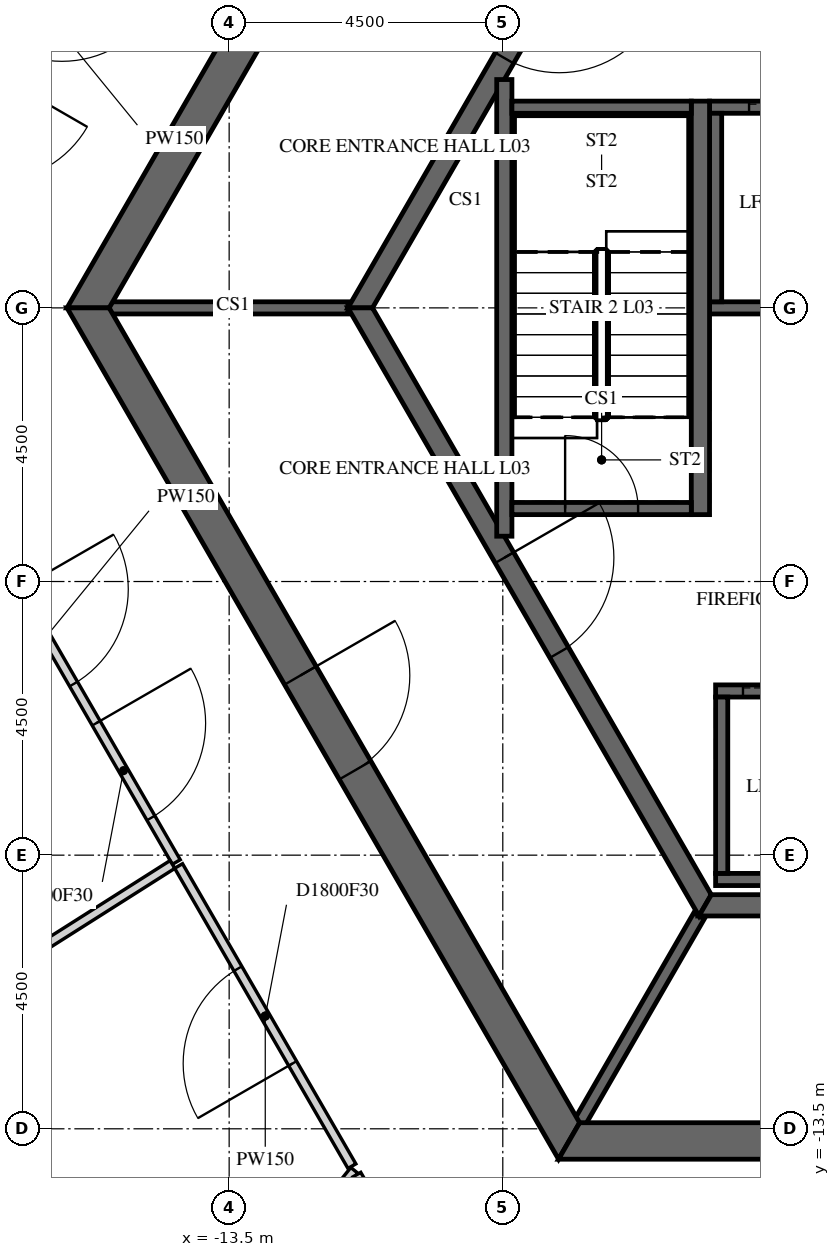
"""IFC4 building model, lengths in metres.
Left out: names, types, materials, properties, quantities, classifications, styles, units other than length and angle.
Written with IfcOpenShell. Run it as: python <this file> out.ifc"""

import sys

from ifc_helpers import new_model, si_unit, direction, frame, frame_2d, origin, place, context, subcontext, project, spatial, polyline, rectangle, outline, extrude, element, fill, save


model = new_model("IFC4")
c1 = context("Model", 3, precision=1e-05, world=origin(), true_north=direction((0.0, 1.0)))
c2 = subcontext(c1, "Body", "Model", "MODEL_VIEW")
j1 = project(units=[si_unit("LENGTHUNIT", "METRE"), si_unit("PLANEANGLEUNIT", "RADIAN")], contexts=[c1])
p1 = place(None, origin())
s1 = spatial("IfcSite", under=j1, at=p1, CompositionType="ELEMENT")
p2 = place(p1, origin())
s2 = spatial("IfcBuilding", under=s1, at=p2, CompositionType="ELEMENT")
p3 = place(p2, frame((0.0, 0.0, 20.5)))
s3 = spatial("IfcBuildingStorey", under=s2, at=p3, CompositionType="ELEMENT", Elevation=20.5)
p4 = place(p3, frame((-7.91, 13.7, -0.25), z_axis=(0.0, 0.0, 1.0), x_axis=(-0.499999880136, -0.866025472988, 0.0)))
e1 = element("IfcWall", 1, at=p4, inside=s3, PredefinedType="SHEAR", context=c2, shape_type="SweptSolid", body=[
    extrude(outline(polyline([(-0.173, -0.3), (15.993, -0.3), (15.646, 0.3), (0.173, 0.3), (-0.173, -0.3)])), origin(), (0.0, 0.0, 1.0), 5.5),
])
p5 = place(p4, frame((7.039, 0.0, 0.25)))
e2 = element("IfcOpeningElement", 2, at=p5, cuts=e1, PredefinedType="OPENING", context=c2, shape_type="SweptSolid", body=[
    extrude(rectangle(XDim=1.8, YDim=2.4, at=frame_2d((0.9, 1.2))), frame((0.0, 0.31, 0.0), z_axis=(0.0, -1.0, 0.0), x_axis=(1.0, 0.0, 0.0)), (0.0, 0.0, 1.0), 0.62),
])
p6 = place(p3, frame((-15.819, 0.0, -0.25), z_axis=(0.0, 0.0, 1.0), x_axis=(0.499999880136, -0.866025472988, 0.0)))
e3 = element("IfcWall", 3, at=p6, inside=s3, PredefinedType="SHEAR", context=c2, shape_type="SweptSolid", body=[
    extrude(outline(polyline([(-0.173, -0.3), (15.993, -0.3), (15.646, 0.3), (0.173, 0.3), (-0.173, -0.3)])), origin(), (0.0, 0.0, 1.0), 5.5),
])
p7 = place(p6, frame((6.981, 0.0, 0.25)))
e4 = element("IfcOpeningElement", 4, at=p7, cuts=e3, PredefinedType="OPENING", context=c2, shape_type="SweptSolid", body=[
    extrude(rectangle(XDim=1.8, YDim=2.4, at=frame_2d((0.9, 1.2))), frame((0.0, 0.31, 0.0), z_axis=(0.0, -1.0, 0.0), x_axis=(1.0, 0.0, 0.0)), (0.0, 0.0, 1.0), 0.62),
])
p8 = place(p3, frame((-7.91, -13.7, -0.25), z_axis=(0.0, 0.0, 1.0), x_axis=(1.0, 0.0, 0.0)))
e5 = element("IfcWall", 5, at=p8, inside=s3, PredefinedType="SHEAR", context=c2, shape_type="SweptSolid", body=[
    extrude(outline(polyline([(-0.173, -0.3), (15.993, -0.3), (15.646, 0.3), (0.173, 0.3), (-0.173, -0.3)])), origin(), (0.0, 0.0, 1.0), 5.5),
])
p9 = place(p8, frame((7.31, 0.0, 0.25)))
e6 = element("IfcOpeningElement", 6, at=p9, cuts=e5, PredefinedType="OPENING", context=c2, shape_type="SweptSolid", body=[
    extrude(rectangle(XDim=1.2, YDim=2.4, at=frame_2d((0.6, 1.2))), frame((0.0, 0.31, 0.0), z_axis=(0.0, -1.0, 0.0), x_axis=(1.0, 0.0, 0.0)), (0.0, 0.0, 1.0), 0.62),
])
p10 = place(p3, frame((-5.673, 9.825, -0.25), z_axis=(0.0, 0.0, 1.0), x_axis=(-0.499995046907, -0.866028263435, 0.0)))
e7 = element("IfcWall", 7, at=p10, inside=s3, PredefinedType="SHEAR", context=c2, shape_type="SweptSolid", body=[
    extrude(outline(polyline([(-0.101, -0.175), (11.446, -0.175), (11.244, 0.175), (0.101, 0.175), (-0.101, -0.175)])), origin(), (0.0, 0.0, 1.0), 5.5),
])
p11 = place(p10, frame((4.801, 0.0, 0.25)))
e8 = element("IfcOpeningElement", 8, at=p11, cuts=e7, PredefinedType="OPENING", context=c2, shape_type="SweptSolid", body=[
    extrude(rectangle(XDim=1.8, YDim=2.4, at=frame_2d((0.9, 1.2))), frame((0.0, 0.185, 0.0), z_axis=(0.0, -1.0, 0.0), x_axis=(1.0, 0.0, 0.0)), (0.0, 0.0, 1.0), 0.37),
])
p12 = place(p3, frame((-11.345, 0.0, -0.25), z_axis=(0.0, 0.0, 1.0), x_axis=(0.499995046907, -0.866028263435, 0.0)))
e9 = element("IfcWall", 9, at=p12, inside=s3, PredefinedType="SHEAR", context=c2, shape_type="SweptSolid", body=[
    extrude(outline(polyline([(-0.101, -0.175), (11.446, -0.175), (11.244, 0.175), (0.101, 0.175), (-0.101, -0.175)])), origin(), (0.0, 0.0, 1.0), 5.5),
])
p13 = place(p12, frame((4.744, 0.0, 0.25)))
e10 = element("IfcOpeningElement", 10, at=p13, cuts=e9, PredefinedType="OPENING", context=c2, shape_type="SweptSolid", body=[
    extrude(rectangle(XDim=1.8, YDim=2.4, at=frame_2d((0.9, 1.2))), frame((0.0, 0.185, 0.0), z_axis=(0.0, -1.0, 0.0), x_axis=(1.0, 0.0, 0.0)), (0.0, 0.0, 1.0), 0.37),
])
p14 = place(p3, frame((-5.673, -9.825, -0.25), z_axis=(0.0, 0.0, 1.0), x_axis=(1.0, 0.0, 0.0)))
e11 = element("IfcWall", 11, at=p14, inside=s3, PredefinedType="SHEAR", context=c2, shape_type="SweptSolid", body=[
    extrude(outline(polyline([(-0.101, -0.175), (11.446, -0.175), (11.244, 0.175), (0.101, 0.175), (-0.101, -0.175)])), origin(), (0.0, 0.0, 1.0), 5.5),
])
p15 = place(p3, frame((-5.6, 3.3, -0.25), z_axis=(0.0, 0.0, 1.0), x_axis=(1.0, 0.0, 0.0)))
e12 = element("IfcWall", 12, at=p15, inside=s3, PredefinedType="SHEAR", context=c2, shape_type="SweptSolid", body=[
    extrude(rectangle(XDim=11.2, YDim=0.2, at=frame_2d((5.6, 0.0))), origin(), (0.0, 0.0, 1.0), 5.5),
])
p16 = place(p15, frame((0.65, 0.0, 0.25)))
e13 = element("IfcOpeningElement", 13, at=p16, cuts=e12, PredefinedType="OPENING", context=c2, shape_type="SweptSolid", body=[
    extrude(rectangle(XDim=1.1, YDim=2.1, at=frame_2d((0.55, 1.05))), frame((0.0, 0.11, 0.0), z_axis=(0.0, -1.0, 0.0), x_axis=(1.0, 0.0, 0.0)), (0.0, 0.0, 1.0), 0.22),
])
p17 = place(p15, frame((2.85, 0.0, 0.25)))
e14 = element("IfcOpeningElement", 14, at=p17, cuts=e12, PredefinedType="OPENING", context=c2, shape_type="SweptSolid", body=[
    extrude(rectangle(XDim=1.1, YDim=2.1, at=frame_2d((0.55, 1.05))), frame((0.0, 0.11, 0.0), z_axis=(0.0, -1.0, 0.0), x_axis=(1.0, 0.0, 0.0)), (0.0, 0.0, 1.0), 0.22),
])
p18 = place(p15, frame((5.05, 0.0, 0.25)))
e15 = element("IfcOpeningElement", 15, at=p18, cuts=e12, PredefinedType="OPENING", context=c2, shape_type="SweptSolid", body=[
    extrude(rectangle(XDim=1.1, YDim=2.1, at=frame_2d((0.55, 1.05))), frame((0.0, 0.11, 0.0), z_axis=(0.0, -1.0, 0.0), x_axis=(1.0, 0.0, 0.0)), (0.0, 0.0, 1.0), 0.22),
])
p19 = place(p15, frame((7.25, 0.0, 0.25)))
e16 = element("IfcOpeningElement", 16, at=p19, cuts=e12, PredefinedType="OPENING", context=c2, shape_type="SweptSolid", body=[
    extrude(rectangle(XDim=1.1, YDim=2.1, at=frame_2d((0.55, 1.05))), frame((0.0, 0.11, 0.0), z_axis=(0.0, -1.0, 0.0), x_axis=(1.0, 0.0, 0.0)), (0.0, 0.0, 1.0), 0.22),
])
p20 = place(p15, frame((9.45, 0.0, 0.25)))
e17 = element("IfcOpeningElement", 17, at=p20, cuts=e12, PredefinedType="OPENING", context=c2, shape_type="SweptSolid", body=[
    extrude(rectangle(XDim=1.1, YDim=2.1, at=frame_2d((0.55, 1.05))), frame((0.0, 0.11, 0.0), z_axis=(0.0, -1.0, 0.0), x_axis=(1.0, 0.0, 0.0)), (0.0, 0.0, 1.0), 0.22),
])
p21 = place(p3, frame((-5.6, 0.0, -0.25), z_axis=(0.0, 0.0, 1.0), x_axis=(1.0, 0.0, 0.0)))
e18 = element("IfcWall", 18, at=p21, inside=s3, PredefinedType="SHEAR", context=c2, shape_type="SweptSolid", body=[
    extrude(rectangle(XDim=11.2, YDim=0.2, at=frame_2d((5.6, 0.0))), origin(), (0.0, 0.0, 1.0), 5.5),
])
p22 = place(p3, frame((-5.5, 0.1, -0.25), z_axis=(0.0, 0.0, 1.0), x_axis=(0.0, 1.0, 0.0)))
e19 = element("IfcWall", 19, at=p22, inside=s3, PredefinedType="SHEAR", context=c2, shape_type="SweptSolid", body=[
    extrude(rectangle(XDim=3.1, YDim=0.2, at=frame_2d((1.55, 0.0))), origin(), (0.0, 0.0, 1.0), 5.5),
])
p23 = place(p3, frame((-5.5, -6.3, -0.25), z_axis=(0.0, 0.0, 1.0), x_axis=(1.0, 0.0, 0.0)))
e20 = element("IfcWall", 20, at=p23, inside=s3, PredefinedType="SHEAR", context=c2, shape_type="SweptSolid", body=[
    extrude(rectangle(XDim=9.2, YDim=0.2, at=frame_2d((4.6, 0.0))), origin(), (0.0, 0.0, 1.0), 5.5),
])
p24 = place(p23, frame((0.45, 0.0, 0.25)))
e21 = element("IfcOpeningElement", 21, at=p24, cuts=e20, PredefinedType="OPENING", context=c2, shape_type="SweptSolid", body=[
    extrude(rectangle(XDim=1.1, YDim=2.1, at=frame_2d((0.55, 1.05))), frame((0.0, 0.11, 0.0), z_axis=(0.0, -1.0, 0.0), x_axis=(1.0, 0.0, 0.0)), (0.0, 0.0, 1.0), 0.22),
])
p25 = place(p23, frame((2.25, 0.0, 0.25)))
e22 = element("IfcOpeningElement", 22, at=p25, cuts=e20, PredefinedType="OPENING", context=c2, shape_type="SweptSolid", body=[
    extrude(rectangle(XDim=1.1, YDim=2.1, at=frame_2d((0.55, 1.05))), frame((0.0, 0.11, 0.0), z_axis=(0.0, -1.0, 0.0), x_axis=(1.0, 0.0, 0.0)), (0.0, 0.0, 1.0), 0.22),
])
p26 = place(p23, frame((4.05, 0.0, 0.25)))
e23 = element("IfcOpeningElement", 23, at=p26, cuts=e20, PredefinedType="OPENING", context=c2, shape_type="SweptSolid", body=[
    extrude(rectangle(XDim=1.1, YDim=2.1, at=frame_2d((0.55, 1.05))), frame((0.0, 0.11, 0.0), z_axis=(0.0, -1.0, 0.0), x_axis=(1.0, 0.0, 0.0)), (0.0, 0.0, 1.0), 0.22),
])
p27 = place(p23, frame((5.85, 0.0, 0.25)))
e24 = element("IfcOpeningElement", 24, at=p27, cuts=e20, PredefinedType="OPENING", context=c2, shape_type="SweptSolid", body=[
    extrude(rectangle(XDim=1.1, YDim=2.1, at=frame_2d((0.55, 1.05))), frame((0.0, 0.11, 0.0), z_axis=(0.0, -1.0, 0.0), x_axis=(1.0, 0.0, 0.0)), (0.0, 0.0, 1.0), 0.22),
])
p28 = place(p23, frame((7.65, 0.0, 0.25)))
e25 = element("IfcOpeningElement", 25, at=p28, cuts=e20, PredefinedType="OPENING", context=c2, shape_type="SweptSolid", body=[
    extrude(rectangle(XDim=1.1, YDim=2.1, at=frame_2d((0.55, 1.05))), frame((0.0, 0.11, 0.0), z_axis=(0.0, -1.0, 0.0), x_axis=(1.0, 0.0, 0.0)), (0.0, 0.0, 1.0), 0.22),
])
p29 = place(p3, frame((-5.5, -9.4, -0.25), z_axis=(0.0, 0.0, 1.0), x_axis=(1.0, 0.0, 0.0)))
e26 = element("IfcWall", 26, at=p29, inside=s3, PredefinedType="SHEAR", context=c2, shape_type="SweptSolid", body=[
    extrude(rectangle(XDim=9.2, YDim=0.2, at=frame_2d((4.6, 0.0))), origin(), (0.0, 0.0, 1.0), 5.5),
])
p30 = place(p3, frame((-5.4, -9.3, -0.25), z_axis=(0.0, 0.0, 1.0), x_axis=(0.0, 1.0, 0.0)))
e27 = element("IfcWall", 27, at=p30, inside=s3, PredefinedType="SHEAR", context=c2, shape_type="SweptSolid", body=[
    extrude(rectangle(XDim=2.9, YDim=0.2, at=frame_2d((1.45, 0.0))), origin(), (0.0, 0.0, 1.0), 5.5),
])
p31 = place(p3, frame((-11.547, 0.0, -0.25), z_axis=(0.0, 0.0, 1.0), x_axis=(-1.0, 0.0, 0.0)))
e28 = element("IfcWall", 28, at=p31, inside=s3, PredefinedType="SHEAR", context=c2, shape_type="SweptSolid", body=[
    extrude(rectangle(XDim=3.926, YDim=0.2, at=frame_2d((1.963, 0.0))), origin(), (0.0, 0.0, 1.0), 5.5),
])
p32 = place(p3, frame((-5.773, -10.0, -0.25), z_axis=(0.0, 0.0, 1.0), x_axis=(-0.500038251005, -0.86600331843, 0.0)))
e29 = element("IfcWall", 29, at=p32, inside=s3, PredefinedType="SHEAR", context=c2, shape_type="SweptSolid", body=[
    extrude(rectangle(XDim=3.926, YDim=0.2, at=frame_2d((1.963, 0.0))), origin(), (0.0, 0.0, 1.0), 5.5),
])
p33 = place(p3, frame((-5.75, -3.4, -0.25), z_axis=(0.0, 0.0, 1.0), x_axis=(0.0, 1.0, 0.0)))
e30 = element("IfcWall", 30, at=p33, inside=s3, PredefinedType="SHEAR", context=c2, shape_type="SweptSolid", body=[
    extrude(rectangle(XDim=6.8, YDim=0.3, at=frame_2d((3.4, 0.0))), origin(), (0.0, 0.0, 1.0), 5.5),
])
p34 = place(p3, frame((-8.975, -3.755, -0.25), z_axis=(0.0, 0.0, 1.0), x_axis=(0.0, 1.0, 0.0)))
e31 = element("IfcWall", 31, at=p34, inside=s3, PredefinedType="SHEAR", context=c2, shape_type="SweptSolid", body=[
    extrude(rectangle(XDim=7.51, YDim=0.25, at=frame_2d((3.755, 0.0))), origin(), (0.0, 0.0, 1.0), 5.5),
])
p35 = place(p3, frame((-8.85, 3.3, -0.25), z_axis=(0.0, 0.0, 1.0), x_axis=(1.0, 0.0, 0.0)))
e32 = element("IfcWall", 32, at=p35, inside=s3, PredefinedType="SHEAR", context=c2, shape_type="SweptSolid", body=[
    extrude(rectangle(XDim=2.95, YDim=0.2, at=frame_2d((1.475, 0.0))), origin(), (0.0, 0.0, 1.0), 5.5),
])
p36 = place(p3, frame((-8.85, -3.3, -0.25), z_axis=(0.0, 0.0, 1.0), x_axis=(1.0, 0.0, 0.0)))
e33 = element("IfcWall", 33, at=p36, inside=s3, PredefinedType="SHEAR", context=c2, shape_type="SweptSolid", body=[
    extrude(rectangle(XDim=2.95, YDim=0.2, at=frame_2d((1.475, 0.0))), origin(), (0.0, 0.0, 1.0), 5.5),
])
p37 = place(p36, frame((0.875, 0.0, 0.25)))
e34 = element("IfcOpeningElement", 34, at=p37, cuts=e33, PredefinedType="OPENING", context=c2, shape_type="SweptSolid", body=[
    extrude(rectangle(XDim=1.2, YDim=2.4, at=frame_2d((0.6, 1.2))), frame((0.0, 0.11, 0.0), z_axis=(0.0, -1.0, 0.0), x_axis=(1.0, 0.0, 0.0)), (0.0, 0.0, 1.0), 0.22),
])
p38 = place(p3, frame((-19.584, -24.28, 0.0), z_axis=(0.0, 0.0, 1.0), x_axis=(0.627807267634, 0.77836882948, 0.0)))
e35 = element("IfcWall", 35, at=p38, inside=s3, PredefinedType="PARTITIONING", context=c2, shape_type="SweptSolid", body=[
    extrude(rectangle(XDim=12.971, YDim=0.15, at=frame_2d((6.485, 0.0))), origin(), (0.0, 0.0, 1.0), 5.25),
])
p39 = place(p3, frame((-18.649, -1.7, 0.0), z_axis=(0.0, 0.0, 1.0), x_axis=(0.499985805234, -0.866033598981, 0.0)))
e36 = element("IfcWall", 36, at=p39, inside=s3, PredefinedType="PARTITIONING", context=c2, shape_type="SweptSolid", body=[
    extrude(rectangle(XDim=8.56, YDim=0.15, at=frame_2d((4.28, 0.0))), origin(), (0.0, 0.0, 1.0), 5.25),
])
p40 = place(p39, frame((0.836, 0.0, 0.0)))
e37 = element("IfcOpeningElement", 37, at=p40, cuts=e36, PredefinedType="OPENING", context=c2, shape_type="SweptSolid", body=[
    extrude(rectangle(XDim=1.8, YDim=2.1, at=frame_2d((0.9, 1.05))), frame((0.0, 0.085, 0.0), z_axis=(0.0, -1.0, 0.0), x_axis=(1.0, 0.0, 0.0)), (0.0, 0.0, 1.0), 0.17),
])
p41 = place(p39, frame((3.38, 0.0, 0.0)))
e38 = element("IfcOpeningElement", 38, at=p41, cuts=e36, PredefinedType="OPENING", context=c2, shape_type="SweptSolid", body=[
    extrude(rectangle(XDim=1.8, YDim=2.1, at=frame_2d((0.9, 1.05))), frame((0.0, 0.085, 0.0), z_axis=(0.0, -1.0, 0.0), x_axis=(1.0, 0.0, 0.0)), (0.0, 0.0, 1.0), 0.17),
])
p42 = place(p39, frame((5.924, 0.0, 0.0)))
e39 = element("IfcOpeningElement", 39, at=p42, cuts=e36, PredefinedType="OPENING", context=c2, shape_type="SweptSolid", body=[
    extrude(rectangle(XDim=1.8, YDim=2.1, at=frame_2d((0.9, 1.05))), frame((0.0, 0.085, 0.0), z_axis=(0.0, -1.0, 0.0), x_axis=(1.0, 0.0, 0.0)), (0.0, 0.0, 1.0), 0.17),
])
p43 = place(p3, frame((-18.603, -11.798, 0.0), z_axis=(0.0, 0.0, 1.0), x_axis=(0.844511305062, 0.535537725677, 0.0)))
e40 = element("IfcWall", 40, at=p43, inside=s3, PredefinedType="PARTITIONING", context=c2, shape_type="SweptSolid", body=[
    extrude(rectangle(XDim=4.938, YDim=0.15, at=frame_2d((2.469, 0.0))), origin(), (0.0, 0.0, 1.0), 4.496),
])
p44 = place(p3, frame((-14.722, 8.5, 0.0), z_axis=(0.0, 0.0, 1.0), x_axis=(-0.500085786821, -0.865975869075, 0.0)))
e41 = element("IfcWall", 41, at=p44, inside=s3, PredefinedType="PARTITIONING", context=c2, shape_type="SweptSolid", body=[
    extrude(rectangle(XDim=7.91, YDim=0.15, at=frame_2d((3.955, 0.0))), origin(), (0.0, 0.0, 1.0), 5.25),
])
p45 = place(p44, frame((0.771, 0.0, 0.0)))
e42 = element("IfcOpeningElement", 42, at=p45, cuts=e41, PredefinedType="OPENING", context=c2, shape_type="SweptSolid", body=[
    extrude(rectangle(XDim=1.8, YDim=2.1, at=frame_2d((0.9, 1.05))), frame((0.0, 0.085, 0.0), z_axis=(0.0, -1.0, 0.0), x_axis=(1.0, 0.0, 0.0)), (0.0, 0.0, 1.0), 0.17),
])
p46 = place(p44, frame((3.055, 0.0, 0.0)))
e43 = element("IfcOpeningElement", 43, at=p46, cuts=e41, PredefinedType="OPENING", context=c2, shape_type="SweptSolid", body=[
    extrude(rectangle(XDim=1.8, YDim=2.1, at=frame_2d((0.9, 1.05))), frame((0.0, 0.085, 0.0), z_axis=(0.0, -1.0, 0.0), x_axis=(1.0, 0.0, 0.0)), (0.0, 0.0, 1.0), 0.17),
])
p47 = place(p44, frame((5.339, 0.0, 0.0)))
e44 = element("IfcOpeningElement", 44, at=p47, cuts=e41, PredefinedType="OPENING", context=c2, shape_type="SweptSolid", body=[
    extrude(rectangle(XDim=1.8, YDim=2.1, at=frame_2d((0.9, 1.05))), frame((0.0, 0.085, 0.0), z_axis=(0.0, -1.0, 0.0), x_axis=(1.0, 0.0, 0.0)), (0.0, 0.0, 1.0), 0.17),
])
p48 = place(p3, frame((-11.481, -14.114, 0.0), z_axis=(0.0, 0.0, 1.0), x_axis=(-0.500049947645, 0.865996564577, 0.0)))
e45 = element("IfcWall", 45, at=p48, inside=s3, PredefinedType="PARTITIONING", context=c2, shape_type="SweptSolid", body=[
    extrude(rectangle(XDim=5.7, YDim=0.15, at=frame_2d((2.85, 0.0))), origin(), (0.0, 0.0, 1.0), 5.25),
])
p49 = place(p48, frame((1.95, 0.0, 0.0)))
e46 = element("IfcOpeningElement", 46, at=p49, cuts=e45, PredefinedType="OPENING", context=c2, shape_type="SweptSolid", body=[
    extrude(rectangle(XDim=1.8, YDim=2.1, at=frame_2d((0.9, 1.05))), frame((0.0, 0.085, 0.0), z_axis=(0.0, -1.0, 0.0), x_axis=(1.0, 0.0, 0.0)), (0.0, 0.0, 1.0), 0.17),
])
p50 = place(p3, frame((-9.815, -17.0, 0.0), z_axis=(0.0, 0.0, 1.0), x_axis=(-0.500080068905, 0.865979171045, 0.0)))
e47 = element("IfcWall", 47, at=p50, inside=s3, PredefinedType="PARTITIONING", context=c2, shape_type="SweptSolid", body=[
    extrude(rectangle(XDim=3.171, YDim=0.15, at=frame_2d((1.586, 0.0))), origin(), (0.0, 0.0, 1.0), 5.25),
])
p51 = place(p50, frame((1.086, 0.0, 0.0)))
e48 = element("IfcOpeningElement", 48, at=p51, cuts=e47, PredefinedType="OPENING", context=c2, shape_type="SweptSolid", body=[
    extrude(rectangle(XDim=1.0, YDim=2.1, at=frame_2d((0.5, 1.05))), frame((0.0, 0.085, 0.0), z_axis=(0.0, -1.0, 0.0), x_axis=(1.0, 0.0, 0.0)), (0.0, 0.0, 1.0), 0.17),
])
p52 = place(p7, origin())
e49 = element("IfcDoor", 49, at=p52, inside=s3, OperationType="DOUBLE_DOOR_SINGLE_SWING", PredefinedType="DOOR", context=c2, shape_type="SweptSolid", body=[
    extrude(rectangle(XDim=1.8, YDim=2.4, at=frame_2d((0.9, 1.2))), frame((0.0, 0.025, 0.0), z_axis=(0.0, -1.0, 0.0), x_axis=(1.0, 0.0, 0.0)), (0.0, 0.0, 1.0), 0.05),
])
fill(e4, e49)
p53 = place(p11, origin())
e50 = element("IfcDoor", 50, at=p53, inside=s3, OperationType="DOUBLE_DOOR_SINGLE_SWING", PredefinedType="DOOR", context=c2, shape_type="SweptSolid", body=[
    extrude(rectangle(XDim=1.8, YDim=2.4, at=frame_2d((0.9, 1.2))), frame((0.0, 0.025, 0.0), z_axis=(0.0, -1.0, 0.0), x_axis=(1.0, 0.0, 0.0)), (0.0, 0.0, 1.0), 0.05),
])
fill(e8, e50)
p54 = place(p13, origin())
e51 = element("IfcDoor", 51, at=p54, inside=s3, OperationType="DOUBLE_DOOR_SINGLE_SWING", PredefinedType="DOOR", context=c2, shape_type="SweptSolid", body=[
    extrude(rectangle(XDim=1.8, YDim=2.4, at=frame_2d((0.9, 1.2))), frame((0.0, 0.025, 0.0), z_axis=(0.0, -1.0, 0.0), x_axis=(1.0, 0.0, 0.0)), (0.0, 0.0, 1.0), 0.05),
])
fill(e10, e51)
p55 = place(p37, origin())
e52 = element("IfcDoor", 52, at=p55, inside=s3, OperationType="SINGLE_SWING_LEFT", PredefinedType="DOOR", context=c2, shape_type="SweptSolid", body=[
    extrude(rectangle(XDim=1.2, YDim=2.4, at=frame_2d((0.6, 1.2))), frame((0.0, 0.025, 0.0), z_axis=(0.0, -1.0, 0.0), x_axis=(1.0, 0.0, 0.0)), (0.0, 0.0, 1.0), 0.05),
])
fill(e34, e52)
p56 = place(p16, origin())
e53 = element("IfcDoor", 53, at=p56, inside=s3, OperationType="SLIDING_TO_LEFT", PredefinedType="DOOR", context=c2, shape_type="SweptSolid", body=[
    extrude(rectangle(XDim=1.1, YDim=2.1, at=frame_2d((0.55, 1.05))), frame((0.0, 0.025, 0.0), z_axis=(0.0, -1.0, 0.0), x_axis=(1.0, 0.0, 0.0)), (0.0, 0.0, 1.0), 0.05),
])
fill(e13, e53)
p57 = place(p24, origin())
e54 = element("IfcDoor", 54, at=p57, inside=s3, OperationType="SLIDING_TO_LEFT", PredefinedType="DOOR", context=c2, shape_type="SweptSolid", body=[
    extrude(rectangle(XDim=1.1, YDim=2.1, at=frame_2d((0.55, 1.05))), frame((0.0, 0.025, 0.0), z_axis=(0.0, -1.0, 0.0), x_axis=(1.0, 0.0, 0.0)), (0.0, 0.0, 1.0), 0.05),
])
fill(e21, e54)
p58 = place(p41, origin())
e55 = element("IfcDoor", 55, at=p58, inside=s3, OperationType="DOUBLE_DOOR_SINGLE_SWING", PredefinedType="DOOR", context=c2, shape_type="SweptSolid", body=[
    extrude(rectangle(XDim=1.8, YDim=2.1, at=frame_2d((0.9, 1.05))), frame((0.0, 0.025, 0.0), z_axis=(0.0, -1.0, 0.0), x_axis=(1.0, 0.0, 0.0)), (0.0, 0.0, 1.0), 0.05),
])
fill(e38, e55)
p59 = place(p42, origin())
e56 = element("IfcDoor", 56, at=p59, inside=s3, OperationType="DOUBLE_DOOR_SINGLE_SWING", PredefinedType="DOOR", context=c2, shape_type="SweptSolid", body=[
    extrude(rectangle(XDim=1.8, YDim=2.1, at=frame_2d((0.9, 1.05))), frame((0.0, 0.025, 0.0), z_axis=(0.0, -1.0, 0.0), x_axis=(1.0, 0.0, 0.0)), (0.0, 0.0, 1.0), 0.05),
])
fill(e39, e56)
p60 = place(p49, origin())
e57 = element("IfcDoor", 57, at=p60, inside=s3, OperationType="DOUBLE_DOOR_SINGLE_SWING", PredefinedType="DOOR", context=c2, shape_type="SweptSolid", body=[
    extrude(rectangle(XDim=1.8, YDim=2.1, at=frame_2d((0.9, 1.05))), frame((0.0, 0.025, 0.0), z_axis=(0.0, -1.0, 0.0), x_axis=(1.0, 0.0, 0.0)), (0.0, 0.0, 1.0), 0.05),
])
fill(e46, e57)
save(model, sys.argv[1])
